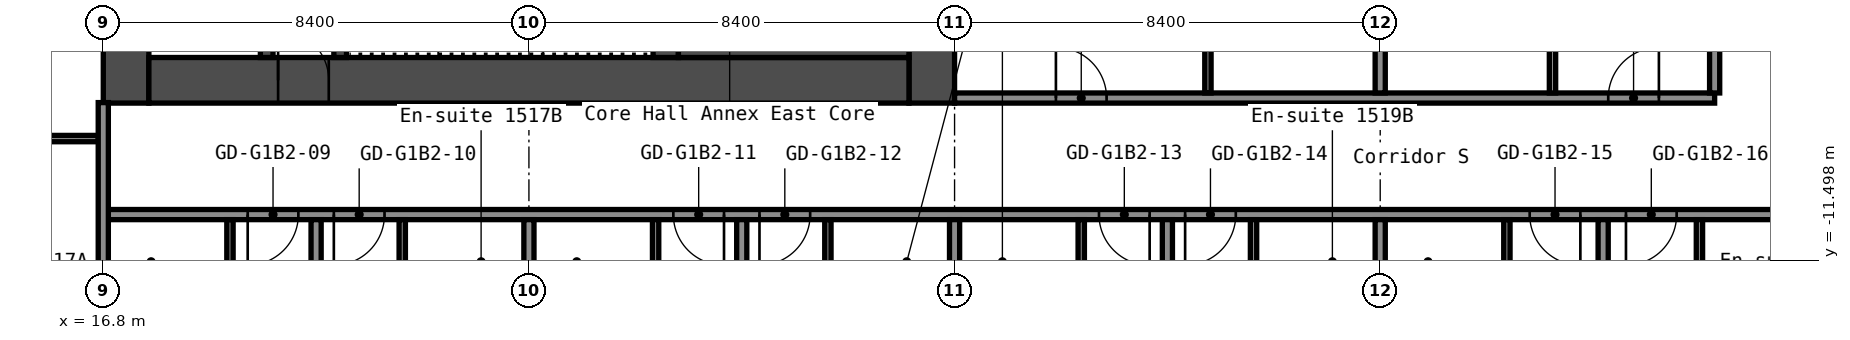
"""IFC4 building model, lengths in metres.
Left out: names, types, materials, properties, quantities, classifications, styles, units other than length and angle.
Written with IfcOpenShell. Run it as: python <this file> out.ifc"""

import sys

from ifc_helpers import new_model, si_unit, direction, frame, frame_2d, origin, place, context, subcontext, project, spatial, rectangle, extrude, element, fill, save


model = new_model("IFC4")
c1 = context("Model", 3, precision=1e-05, world=origin(), true_north=direction((0.0, 1.0)))
c2 = subcontext(c1, "Body", "Model", "MODEL_VIEW")
j1 = project(units=[si_unit("LENGTHUNIT", "METRE"), si_unit("PLANEANGLEUNIT", "RADIAN")], contexts=[c1])
p1 = place(None, origin())
s1 = spatial("IfcSite", under=j1, at=p1, CompositionType="ELEMENT")
p2 = place(p1, origin())
s2 = spatial("IfcBuilding", under=s1, at=p2, CompositionType="ELEMENT")
p3 = place(p2, frame((0.0, 0.0, 55.0)))
s3 = spatial("IfcBuildingStorey", under=s2, at=p3, CompositionType="ELEMENT", Elevation=55.0)
p4 = place(p3, frame((17.25, -8.4, 0.0), z_axis=(0.0, 0.0, 1.0), x_axis=(0.0, 1.0, 0.0)))
e1 = element("IfcWall", 1, at=p4, inside=s3, PredefinedType="SHEAR", context=c2, shape_type="SweptSolid", body=[
    extrude(rectangle(XDim=16.8, YDim=0.9, at=frame_2d((8.4, 0.0))), origin(), (0.0, 0.0, 1.0), 2.8),
])
p5 = place(p4, frame((12.75, 0.0, 0.0)))
e2 = element("IfcOpeningElement", 2, at=p5, cuts=e1, PredefinedType="OPENING", context=c2, shape_type="SweptSolid", body=[
    extrude(rectangle(XDim=1.2, YDim=2.1, at=frame_2d((0.6, 1.05))), frame((0.0, 0.46, 0.0), z_axis=(0.0, -1.0, 0.0), x_axis=(1.0, 0.0, 0.0)), (0.0, 0.0, 1.0), 0.92),
])
p6 = place(p4, frame((2.85, 0.0, 0.0)))
e3 = element("IfcOpeningElement", 3, at=p6, cuts=e1, PredefinedType="OPENING", context=c2, shape_type="SweptSolid", body=[
    extrude(rectangle(XDim=1.2, YDim=2.1, at=frame_2d((0.6, 1.05))), frame((0.0, 0.46, 0.0), z_axis=(0.0, -1.0, 0.0), x_axis=(1.0, 0.0, 0.0)), (0.0, 0.0, 1.0), 0.92),
])
p7 = place(p3, frame((33.15, -8.4, 0.0), z_axis=(0.0, 0.0, 1.0), x_axis=(0.0, 1.0, 0.0)))
e4 = element("IfcWall", 4, at=p7, inside=s3, PredefinedType="SHEAR", context=c2, shape_type="SweptSolid", body=[
    extrude(rectangle(XDim=16.8, YDim=0.9, at=frame_2d((8.4, 0.0))), origin(), (0.0, 0.0, 1.0), 2.8),
])
p8 = place(p3, frame((17.7, -7.95, 0.0), z_axis=(0.0, 0.0, 1.0), x_axis=(1.0, 0.0, 0.0)))
e5 = element("IfcWall", 5, at=p8, inside=s3, PredefinedType="SHEAR", context=c2, shape_type="SweptSolid", body=[
    extrude(rectangle(XDim=15.0, YDim=0.9, at=frame_2d((7.5, 0.0))), origin(), (0.0, 0.0, 1.0), 2.8),
])
p9 = place(p8, frame((2.55, 0.0, 0.0)))
e6 = element("IfcOpeningElement", 6, at=p9, cuts=e5, PredefinedType="OPENING", context=c2, shape_type="SweptSolid", body=[
    extrude(rectangle(XDim=1.0, YDim=2.1, at=frame_2d((0.5, 1.05))), frame((0.0, 0.46, 0.0), z_axis=(0.0, -1.0, 0.0), x_axis=(1.0, 0.0, 0.0)), (0.0, 0.0, 1.0), 0.92),
])
p10 = place(p3, frame((20.025, -7.5, 0.0), z_axis=(0.0, 0.0, 1.0), x_axis=(0.0, 1.0, 0.0)))
e7 = element("IfcWall", 7, at=p10, inside=s3, PredefinedType="SHEAR", context=c2, shape_type="SweptSolid", body=[
    extrude(rectangle(XDim=6.3, YDim=0.25, at=frame_2d((3.15, 0.0))), origin(), (0.0, 0.0, 1.0), 2.8),
])
p11 = place(p10, frame((2.4, 0.0, 0.0)))
e8 = element("IfcOpeningElement", 8, at=p11, cuts=e7, PredefinedType="OPENING", context=c2, shape_type="SweptSolid", body=[
    extrude(rectangle(XDim=1.0, YDim=2.1, at=frame_2d((0.5, 1.05))), frame((0.0, 0.135, 0.0), z_axis=(0.0, -1.0, 0.0), x_axis=(1.0, 0.0, 0.0)), (0.0, 0.0, 1.0), 0.27),
])
p12 = place(p3, frame((21.475, -7.5, 0.0), z_axis=(0.0, 0.0, 1.0), x_axis=(0.0, 1.0, 0.0)))
e9 = element("IfcWall", 9, at=p12, inside=s3, PredefinedType="SHEAR", context=c2, shape_type="SweptSolid", body=[
    extrude(rectangle(XDim=3.75, YDim=0.25, at=frame_2d((1.875, 0.0))), origin(), (0.0, 0.0, 1.0), 2.8),
])
p13 = place(p12, frame((1.3, 0.0, 0.0)))
e10 = element("IfcOpeningElement", 10, at=p13, cuts=e9, PredefinedType="OPENING", context=c2, shape_type="SweptSolid", body=[
    extrude(rectangle(XDim=1.2, YDim=2.1, at=frame_2d((0.6, 1.05))), frame((0.0, 0.135, 0.0), z_axis=(0.0, -1.0, 0.0), x_axis=(1.0, 0.0, 0.0)), (0.0, 0.0, 1.0), 0.27),
])
p14 = place(p3, frame((27.9, -7.5, 0.0), z_axis=(0.0, 0.0, 1.0), x_axis=(0.0, 1.0, 0.0)))
e11 = element("IfcWall", 11, at=p14, inside=s3, PredefinedType="SHEAR", context=c2, shape_type="SweptSolid", body=[
    extrude(rectangle(XDim=3.75, YDim=0.5, at=frame_2d((1.875, 0.0))), origin(), (0.0, 0.0, 1.0), 2.8),
])
p15 = place(p3, frame((28.15, -6.75, 0.0), z_axis=(0.0, 0.0, 1.0), x_axis=(1.0, 0.0, 0.0)))
e12 = element("IfcWall", 12, at=p15, inside=s3, PredefinedType="SHEAR", context=c2, shape_type="SweptSolid", body=[
    extrude(rectangle(XDim=4.55, YDim=1.5, at=frame_2d((2.275, 0.0))), origin(), (0.0, 0.0, 1.0), 2.8),
])
p16 = place(p3, frame((16.8, -10.6, 0.0), z_axis=(0.0, 0.0, 1.0), x_axis=(1.0, 0.0, 0.0)))
e13 = element("IfcWall", 13, at=p16, inside=s3, PredefinedType="PARTITIONING", context=c2, shape_type="SweptSolid", body=[
    extrude(rectangle(XDim=34.3, YDim=0.2, at=frame_2d((17.15, 0.0))), origin(), (0.0, 0.0, 1.0), 2.8),
])
p17 = place(p16, frame((2.85, 0.0, 0.0)))
e14 = element("IfcOpeningElement", 14, at=p17, cuts=e13, PredefinedType="OPENING", context=c2, shape_type="SweptSolid", body=[
    extrude(rectangle(XDim=1.0, YDim=2.1, at=frame_2d((0.5, 1.05))), frame((0.0, 0.11, 0.0), z_axis=(0.0, -1.0, 0.0), x_axis=(1.0, 0.0, 0.0)), (0.0, 0.0, 1.0), 0.22),
])
p18 = place(p16, frame((4.55, 0.0, 0.0)))
e15 = element("IfcOpeningElement", 15, at=p18, cuts=e13, PredefinedType="OPENING", context=c2, shape_type="SweptSolid", body=[
    extrude(rectangle(XDim=1.0, YDim=2.1, at=frame_2d((0.5, 1.05))), frame((0.0, 0.11, 0.0), z_axis=(0.0, -1.0, 0.0), x_axis=(1.0, 0.0, 0.0)), (0.0, 0.0, 1.0), 0.22),
])
p19 = place(p16, frame((11.25, 0.0, 0.0)))
e16 = element("IfcOpeningElement", 16, at=p19, cuts=e13, PredefinedType="OPENING", context=c2, shape_type="SweptSolid", body=[
    extrude(rectangle(XDim=1.0, YDim=2.1, at=frame_2d((0.5, 1.05))), frame((0.0, 0.11, 0.0), z_axis=(0.0, -1.0, 0.0), x_axis=(1.0, 0.0, 0.0)), (0.0, 0.0, 1.0), 0.22),
])
p20 = place(p16, frame((12.95, 0.0, 0.0)))
e17 = element("IfcOpeningElement", 17, at=p20, cuts=e13, PredefinedType="OPENING", context=c2, shape_type="SweptSolid", body=[
    extrude(rectangle(XDim=1.0, YDim=2.1, at=frame_2d((0.5, 1.05))), frame((0.0, 0.11, 0.0), z_axis=(0.0, -1.0, 0.0), x_axis=(1.0, 0.0, 0.0)), (0.0, 0.0, 1.0), 0.22),
])
p21 = place(p16, frame((19.65, 0.0, 0.0)))
e18 = element("IfcOpeningElement", 18, at=p21, cuts=e13, PredefinedType="OPENING", context=c2, shape_type="SweptSolid", body=[
    extrude(rectangle(XDim=1.0, YDim=2.1, at=frame_2d((0.5, 1.05))), frame((0.0, 0.11, 0.0), z_axis=(0.0, -1.0, 0.0), x_axis=(1.0, 0.0, 0.0)), (0.0, 0.0, 1.0), 0.22),
])
p22 = place(p16, frame((21.35, 0.0, 0.0)))
e19 = element("IfcOpeningElement", 19, at=p22, cuts=e13, PredefinedType="OPENING", context=c2, shape_type="SweptSolid", body=[
    extrude(rectangle(XDim=1.0, YDim=2.1, at=frame_2d((0.5, 1.05))), frame((0.0, 0.11, 0.0), z_axis=(0.0, -1.0, 0.0), x_axis=(1.0, 0.0, 0.0)), (0.0, 0.0, 1.0), 0.22),
])
p23 = place(p16, frame((28.15, 0.0, 0.0)))
e20 = element("IfcOpeningElement", 20, at=p23, cuts=e13, PredefinedType="OPENING", context=c2, shape_type="SweptSolid", body=[
    extrude(rectangle(XDim=1.0, YDim=2.1, at=frame_2d((0.5, 1.05))), frame((0.0, 0.11, 0.0), z_axis=(0.0, -1.0, 0.0), x_axis=(1.0, 0.0, 0.0)), (0.0, 0.0, 1.0), 0.22),
])
p24 = place(p16, frame((30.05, 0.0, 0.0)))
e21 = element("IfcOpeningElement", 21, at=p24, cuts=e13, PredefinedType="OPENING", context=c2, shape_type="SweptSolid", body=[
    extrude(rectangle(XDim=1.0, YDim=2.1, at=frame_2d((0.5, 1.05))), frame((0.0, 0.11, 0.0), z_axis=(0.0, -1.0, 0.0), x_axis=(1.0, 0.0, 0.0)), (0.0, 0.0, 1.0), 0.22),
])
p25 = place(p3, frame((14.363, -9.1, 0.0), z_axis=(0.0, 0.0, 1.0), x_axis=(1.0, 0.0, 0.0)))
e22 = element("IfcWall", 22, at=p25, inside=s3, PredefinedType="PARTITIONING", context=c2, shape_type="SweptSolid", body=[
    extrude(rectangle(XDim=2.337, YDim=0.125, at=frame_2d((1.169, 0.0))), origin(), (0.0, 0.0, 1.0), 2.8),
])
p26 = place(p3, frame((33.6, -8.3, 0.0), z_axis=(0.0, 0.0, 1.0), x_axis=(1.0, 0.0, 0.0)))
e23 = element("IfcWall", 23, at=p26, inside=s3, PredefinedType="PARTITIONING", context=c2, shape_type="SweptSolid", body=[
    extrude(rectangle(XDim=15.0, YDim=0.2, at=frame_2d((7.5, 0.0))), origin(), (0.0, 0.0, 1.0), 2.8),
])
p27 = place(p26, frame((2.0, 0.0, 0.0)))
e24 = element("IfcOpeningElement", 24, at=p27, cuts=e23, PredefinedType="OPENING", context=c2, shape_type="SweptSolid", body=[
    extrude(rectangle(XDim=1.0, YDim=2.1, at=frame_2d((0.5, 1.05))), frame((0.0, 0.11, 0.0), z_axis=(0.0, -1.0, 0.0), x_axis=(1.0, 0.0, 0.0)), (0.0, 0.0, 1.0), 0.22),
])
p28 = place(p26, frame((12.9, 0.0, 0.0)))
e25 = element("IfcOpeningElement", 25, at=p28, cuts=e23, PredefinedType="OPENING", context=c2, shape_type="SweptSolid", body=[
    extrude(rectangle(XDim=1.0, YDim=2.1, at=frame_2d((0.5, 1.05))), frame((0.0, 0.11, 0.0), z_axis=(0.0, -1.0, 0.0), x_axis=(1.0, 0.0, 0.0)), (0.0, 0.0, 1.0), 0.22),
])
p29 = place(p3, frame((16.8, -20.3, 0.0), z_axis=(0.0, 0.0, 1.0), x_axis=(0.0, 1.0, 0.0)))
e26 = element("IfcWall", 26, at=p29, inside=s3, PredefinedType="PARTITIONING", context=c2, shape_type="SweptSolid", body=[
    extrude(rectangle(XDim=11.91, YDim=0.2, at=frame_2d((5.955, 0.0))), origin(), (0.0, 0.0, 1.0), 2.8),
])
p30 = place(p3, frame((19.3, -13.6, 0.0), z_axis=(0.0, 0.0, 1.0), x_axis=(0.0, 1.0, 0.0)))
e27 = element("IfcWall", 27, at=p30, inside=s3, PredefinedType="PARTITIONING", context=c2, shape_type="SweptSolid", body=[
    extrude(rectangle(XDim=2.9, YDim=0.125, at=frame_2d((1.45, 0.0))), origin(), (0.0, 0.0, 1.0), 2.8),
])
p31 = place(p30, frame((0.6, 0.0, 0.0)))
e28 = element("IfcOpeningElement", 28, at=p31, cuts=e27, PredefinedType="OPENING", context=c2, shape_type="SweptSolid", body=[
    extrude(rectangle(XDim=0.8, YDim=2.1, at=frame_2d((0.4, 1.05))), frame((0.0, 0.073, 0.0), z_axis=(0.0, -1.0, 0.0), x_axis=(1.0, 0.0, 0.0)), (0.0, 0.0, 1.0), 0.145),
])
p32 = place(p3, frame((21.0, -20.3, 0.0), z_axis=(0.0, 0.0, 1.0), x_axis=(0.0, 1.0, 0.0)))
e29 = element("IfcWall", 29, at=p32, inside=s3, PredefinedType="PARTITIONING", context=c2, shape_type="SweptSolid", body=[
    extrude(rectangle(XDim=9.6, YDim=0.2, at=frame_2d((4.8, 0.0))), origin(), (0.0, 0.0, 1.0), 2.8),
])
p33 = place(p3, frame((22.7, -13.6, 0.0), z_axis=(0.0, 0.0, 1.0), x_axis=(0.0, 1.0, 0.0)))
e30 = element("IfcWall", 30, at=p33, inside=s3, PredefinedType="PARTITIONING", context=c2, shape_type="SweptSolid", body=[
    extrude(rectangle(XDim=2.9, YDim=0.125, at=frame_2d((1.45, 0.0))), origin(), (0.0, 0.0, 1.0), 2.8),
])
p34 = place(p33, frame((0.6, 0.0, 0.0)))
e31 = element("IfcOpeningElement", 31, at=p34, cuts=e30, PredefinedType="OPENING", context=c2, shape_type="SweptSolid", body=[
    extrude(rectangle(XDim=0.8, YDim=2.1, at=frame_2d((0.4, 1.05))), frame((0.0, 0.073, 0.0), z_axis=(0.0, -1.0, 0.0), x_axis=(1.0, 0.0, 0.0)), (0.0, 0.0, 1.0), 0.145),
])
p35 = place(p3, frame((25.2, -20.3, 0.0), z_axis=(0.0, 0.0, 1.0), x_axis=(0.0, 1.0, 0.0)))
e32 = element("IfcWall", 32, at=p35, inside=s3, PredefinedType="PARTITIONING", context=c2, shape_type="SweptSolid", body=[
    extrude(rectangle(XDim=9.6, YDim=0.2, at=frame_2d((4.8, 0.0))), origin(), (0.0, 0.0, 1.0), 2.8),
])
p36 = place(p3, frame((27.7, -13.6, 0.0), z_axis=(0.0, 0.0, 1.0), x_axis=(0.0, 1.0, 0.0)))
e33 = element("IfcWall", 33, at=p36, inside=s3, PredefinedType="PARTITIONING", context=c2, shape_type="SweptSolid", body=[
    extrude(rectangle(XDim=2.9, YDim=0.125, at=frame_2d((1.45, 0.0))), origin(), (0.0, 0.0, 1.0), 2.8),
])
p37 = place(p36, frame((0.6, 0.0, 0.0)))
e34 = element("IfcOpeningElement", 34, at=p37, cuts=e33, PredefinedType="OPENING", context=c2, shape_type="SweptSolid", body=[
    extrude(rectangle(XDim=0.8, YDim=2.1, at=frame_2d((0.4, 1.05))), frame((0.0, 0.073, 0.0), z_axis=(0.0, -1.0, 0.0), x_axis=(1.0, 0.0, 0.0)), (0.0, 0.0, 1.0), 0.145),
])
p38 = place(p3, frame((29.4, -20.3, 0.0), z_axis=(0.0, 0.0, 1.0), x_axis=(0.0, 1.0, 0.0)))
e35 = element("IfcWall", 35, at=p38, inside=s3, PredefinedType="PARTITIONING", context=c2, shape_type="SweptSolid", body=[
    extrude(rectangle(XDim=9.6, YDim=0.2, at=frame_2d((4.8, 0.0))), origin(), (0.0, 0.0, 1.0), 2.8),
])
p39 = place(p3, frame((31.1, -13.6, 0.0), z_axis=(0.0, 0.0, 1.0), x_axis=(0.0, 1.0, 0.0)))
e36 = element("IfcWall", 36, at=p39, inside=s3, PredefinedType="PARTITIONING", context=c2, shape_type="SweptSolid", body=[
    extrude(rectangle(XDim=2.9, YDim=0.125, at=frame_2d((1.45, 0.0))), origin(), (0.0, 0.0, 1.0), 2.8),
])
p40 = place(p39, frame((0.6, 0.0, 0.0)))
e37 = element("IfcOpeningElement", 37, at=p40, cuts=e36, PredefinedType="OPENING", context=c2, shape_type="SweptSolid", body=[
    extrude(rectangle(XDim=0.8, YDim=2.1, at=frame_2d((0.4, 1.05))), frame((0.0, 0.073, 0.0), z_axis=(0.0, -1.0, 0.0), x_axis=(1.0, 0.0, 0.0)), (0.0, 0.0, 1.0), 0.145),
])
p41 = place(p3, frame((33.6, -20.3, 0.0), z_axis=(0.0, 0.0, 1.0), x_axis=(0.0, 1.0, 0.0)))
e38 = element("IfcWall", 38, at=p41, inside=s3, PredefinedType="PARTITIONING", context=c2, shape_type="SweptSolid", body=[
    extrude(rectangle(XDim=9.6, YDim=0.2, at=frame_2d((4.8, 0.0))), origin(), (0.0, 0.0, 1.0), 2.8),
])
p42 = place(p3, frame((36.1, -13.6, 0.0), z_axis=(0.0, 0.0, 1.0), x_axis=(0.0, 1.0, 0.0)))
e39 = element("IfcWall", 39, at=p42, inside=s3, PredefinedType="PARTITIONING", context=c2, shape_type="SweptSolid", body=[
    extrude(rectangle(XDim=2.9, YDim=0.125, at=frame_2d((1.45, 0.0))), origin(), (0.0, 0.0, 1.0), 2.8),
])
p43 = place(p42, frame((0.6, 0.0, 0.0)))
e40 = element("IfcOpeningElement", 40, at=p43, cuts=e39, PredefinedType="OPENING", context=c2, shape_type="SweptSolid", body=[
    extrude(rectangle(XDim=0.8, YDim=2.1, at=frame_2d((0.4, 1.05))), frame((0.0, 0.073, 0.0), z_axis=(0.0, -1.0, 0.0), x_axis=(1.0, 0.0, 0.0)), (0.0, 0.0, 1.0), 0.145),
])
p44 = place(p3, frame((37.8, -20.3, 0.0), z_axis=(0.0, 0.0, 1.0), x_axis=(0.0, 1.0, 0.0)))
e41 = element("IfcWall", 41, at=p44, inside=s3, PredefinedType="PARTITIONING", context=c2, shape_type="SweptSolid", body=[
    extrude(rectangle(XDim=9.6, YDim=0.2, at=frame_2d((4.8, 0.0))), origin(), (0.0, 0.0, 1.0), 2.8),
])
p45 = place(p3, frame((38.6, -8.2, 0.0), z_axis=(0.0, 0.0, 1.0), x_axis=(0.0, 1.0, 0.0)))
e42 = element("IfcWall", 42, at=p45, inside=s3, PredefinedType="PARTITIONING", context=c2, shape_type="SweptSolid", body=[
    extrude(rectangle(XDim=3.3, YDim=0.125, at=frame_2d((1.65, 0.0))), origin(), (0.0, 0.0, 1.0), 2.8),
])
p46 = place(p3, frame((39.5, -13.6, 0.0), z_axis=(0.0, 0.0, 1.0), x_axis=(0.0, 1.0, 0.0)))
e43 = element("IfcWall", 43, at=p46, inside=s3, PredefinedType="PARTITIONING", context=c2, shape_type="SweptSolid", body=[
    extrude(rectangle(XDim=2.9, YDim=0.125, at=frame_2d((1.45, 0.0))), origin(), (0.0, 0.0, 1.0), 2.8),
])
p47 = place(p46, frame((0.6, 0.0, 0.0)))
e44 = element("IfcOpeningElement", 44, at=p47, cuts=e43, PredefinedType="OPENING", context=c2, shape_type="SweptSolid", body=[
    extrude(rectangle(XDim=0.8, YDim=2.1, at=frame_2d((0.4, 1.05))), frame((0.0, 0.073, 0.0), z_axis=(0.0, -1.0, 0.0), x_axis=(1.0, 0.0, 0.0)), (0.0, 0.0, 1.0), 0.145),
])
p48 = place(p3, frame((42.0, -20.3, 0.0), z_axis=(0.0, 0.0, 1.0), x_axis=(0.0, 1.0, 0.0)))
e45 = element("IfcWall", 45, at=p48, inside=s3, PredefinedType="PARTITIONING", context=c2, shape_type="SweptSolid", body=[
    extrude(rectangle(XDim=9.6, YDim=0.2, at=frame_2d((4.8, 0.0))), origin(), (0.0, 0.0, 1.0), 2.8),
])
p49 = place(p3, frame((42.0, -8.2, 0.0), z_axis=(0.0, 0.0, 1.0), x_axis=(0.0, 1.0, 0.0)))
e46 = element("IfcWall", 46, at=p49, inside=s3, PredefinedType="PARTITIONING", context=c2, shape_type="SweptSolid", body=[
    extrude(rectangle(XDim=16.4, YDim=0.2, at=frame_2d((8.2, 0.0))), origin(), (0.0, 0.0, 1.0), 2.8),
])
p50 = place(p3, frame((44.5, -13.6, 0.0), z_axis=(0.0, 0.0, 1.0), x_axis=(0.0, 1.0, 0.0)))
e47 = element("IfcWall", 47, at=p50, inside=s3, PredefinedType="PARTITIONING", context=c2, shape_type="SweptSolid", body=[
    extrude(rectangle(XDim=2.9, YDim=0.125, at=frame_2d((1.45, 0.0))), origin(), (0.0, 0.0, 1.0), 2.8),
])
p51 = place(p50, frame((0.6, 0.0, 0.0)))
e48 = element("IfcOpeningElement", 48, at=p51, cuts=e47, PredefinedType="OPENING", context=c2, shape_type="SweptSolid", body=[
    extrude(rectangle(XDim=0.8, YDim=2.1, at=frame_2d((0.4, 1.05))), frame((0.0, 0.073, 0.0), z_axis=(0.0, -1.0, 0.0), x_axis=(1.0, 0.0, 0.0)), (0.0, 0.0, 1.0), 0.145),
])
p52 = place(p3, frame((45.4, -8.2, 0.0), z_axis=(0.0, 0.0, 1.0), x_axis=(0.0, 1.0, 0.0)))
e49 = element("IfcWall", 49, at=p52, inside=s3, PredefinedType="PARTITIONING", context=c2, shape_type="SweptSolid", body=[
    extrude(rectangle(XDim=3.3, YDim=0.125, at=frame_2d((1.65, 0.0))), origin(), (0.0, 0.0, 1.0), 2.8),
])
p53 = place(p3, frame((46.4, -20.3, 0.0), z_axis=(0.0, 0.0, 1.0), x_axis=(0.0, 1.0, 0.0)))
e50 = element("IfcWall", 50, at=p53, inside=s3, PredefinedType="PARTITIONING", context=c2, shape_type="SweptSolid", body=[
    extrude(rectangle(XDim=9.6, YDim=0.2, at=frame_2d((4.8, 0.0))), origin(), (0.0, 0.0, 1.0), 2.8),
])
p54 = place(p3, frame((48.3, -13.6, 0.0), z_axis=(0.0, 0.0, 1.0), x_axis=(0.0, 1.0, 0.0)))
e51 = element("IfcWall", 51, at=p54, inside=s3, PredefinedType="PARTITIONING", context=c2, shape_type="SweptSolid", body=[
    extrude(rectangle(XDim=2.9, YDim=0.125, at=frame_2d((1.45, 0.0))), origin(), (0.0, 0.0, 1.0), 2.8),
])
p55 = place(p54, frame((0.6, 0.0, 0.0)))
e52 = element("IfcOpeningElement", 52, at=p55, cuts=e51, PredefinedType="OPENING", context=c2, shape_type="SweptSolid", body=[
    extrude(rectangle(XDim=0.8, YDim=2.1, at=frame_2d((0.4, 1.05))), frame((0.0, 0.073, 0.0), z_axis=(0.0, -1.0, 0.0), x_axis=(1.0, 0.0, 0.0)), (0.0, 0.0, 1.0), 0.145),
])
p56 = place(p3, frame((48.6, -8.2, 0.0), z_axis=(0.0, 0.0, 1.0), x_axis=(0.0, 1.0, 0.0)))
e53 = element("IfcWall", 53, at=p56, inside=s3, PredefinedType="PARTITIONING", context=c2, shape_type="SweptSolid", body=[
    extrude(rectangle(XDim=16.4, YDim=0.2, at=frame_2d((8.2, 0.0))), origin(), (0.0, 0.0, 1.0), 2.8),
])
p57 = place(p9, origin())
e54 = element("IfcDoor", 54, at=p57, inside=s3, OperationType="SINGLE_SWING_RIGHT", PredefinedType="DOOR", context=c2, shape_type="SweptSolid", body=[
    extrude(rectangle(XDim=1.0, YDim=2.1, at=frame_2d((0.5, 1.05))), frame((0.0, 0.025, 0.0), z_axis=(0.0, -1.0, 0.0), x_axis=(1.0, 0.0, 0.0)), (0.0, 0.0, 1.0), 0.05),
])
fill(e6, e54)
p58 = place(p17, origin())
e55 = element("IfcDoor", 55, at=p58, inside=s3, OperationType="SINGLE_SWING_LEFT", PredefinedType="DOOR", context=c2, shape_type="SweptSolid", body=[
    extrude(rectangle(XDim=1.0, YDim=2.1, at=frame_2d((0.5, 1.05))), frame((0.0, 0.025, 0.0), z_axis=(0.0, -1.0, 0.0), x_axis=(1.0, 0.0, 0.0)), (0.0, 0.0, 1.0), 0.05),
])
fill(e14, e55)
p59 = place(p18, origin())
e56 = element("IfcDoor", 56, at=p59, inside=s3, OperationType="SINGLE_SWING_LEFT", PredefinedType="DOOR", context=c2, shape_type="SweptSolid", body=[
    extrude(rectangle(XDim=1.0, YDim=2.1, at=frame_2d((0.5, 1.05))), frame((0.0, 0.025, 0.0), z_axis=(0.0, -1.0, 0.0), x_axis=(1.0, 0.0, 0.0)), (0.0, 0.0, 1.0), 0.05),
])
fill(e15, e56)
p60 = place(p19, origin())
e57 = element("IfcDoor", 57, at=p60, inside=s3, OperationType="SINGLE_SWING_RIGHT", PredefinedType="DOOR", context=c2, shape_type="SweptSolid", body=[
    extrude(rectangle(XDim=1.0, YDim=2.1, at=frame_2d((0.5, 1.05))), frame((0.0, 0.025, 0.0), z_axis=(0.0, -1.0, 0.0), x_axis=(1.0, 0.0, 0.0)), (0.0, 0.0, 1.0), 0.05),
])
fill(e16, e57)
p61 = place(p20, origin())
e58 = element("IfcDoor", 58, at=p61, inside=s3, OperationType="SINGLE_SWING_LEFT", PredefinedType="DOOR", context=c2, shape_type="SweptSolid", body=[
    extrude(rectangle(XDim=1.0, YDim=2.1, at=frame_2d((0.5, 1.05))), frame((0.0, 0.025, 0.0), z_axis=(0.0, -1.0, 0.0), x_axis=(1.0, 0.0, 0.0)), (0.0, 0.0, 1.0), 0.05),
])
fill(e17, e58)
p62 = place(p21, origin())
e59 = element("IfcDoor", 59, at=p62, inside=s3, OperationType="SINGLE_SWING_RIGHT", PredefinedType="DOOR", context=c2, shape_type="SweptSolid", body=[
    extrude(rectangle(XDim=1.0, YDim=2.1, at=frame_2d((0.5, 1.05))), frame((0.0, 0.025, 0.0), z_axis=(0.0, -1.0, 0.0), x_axis=(1.0, 0.0, 0.0)), (0.0, 0.0, 1.0), 0.05),
])
fill(e18, e59)
p63 = place(p22, origin())
e60 = element("IfcDoor", 60, at=p63, inside=s3, OperationType="SINGLE_SWING_LEFT", PredefinedType="DOOR", context=c2, shape_type="SweptSolid", body=[
    extrude(rectangle(XDim=1.0, YDim=2.1, at=frame_2d((0.5, 1.05))), frame((0.0, 0.025, 0.0), z_axis=(0.0, -1.0, 0.0), x_axis=(1.0, 0.0, 0.0)), (0.0, 0.0, 1.0), 0.05),
])
fill(e19, e60)
p64 = place(p23, origin())
e61 = element("IfcDoor", 61, at=p64, inside=s3, OperationType="SINGLE_SWING_RIGHT", PredefinedType="DOOR", context=c2, shape_type="SweptSolid", body=[
    extrude(rectangle(XDim=1.0, YDim=2.1, at=frame_2d((0.5, 1.05))), frame((0.0, 0.025, 0.0), z_axis=(0.0, -1.0, 0.0), x_axis=(1.0, 0.0, 0.0)), (0.0, 0.0, 1.0), 0.05),
])
fill(e20, e61)
p65 = place(p24, origin())
e62 = element("IfcDoor", 62, at=p65, inside=s3, OperationType="SINGLE_SWING_LEFT", PredefinedType="DOOR", context=c2, shape_type="SweptSolid", body=[
    extrude(rectangle(XDim=1.0, YDim=2.1, at=frame_2d((0.5, 1.05))), frame((0.0, 0.025, 0.0), z_axis=(0.0, -1.0, 0.0), x_axis=(1.0, 0.0, 0.0)), (0.0, 0.0, 1.0), 0.05),
])
fill(e21, e62)
p66 = place(p27, origin())
e63 = element("IfcDoor", 63, at=p66, inside=s3, OperationType="SINGLE_SWING_RIGHT", PredefinedType="DOOR", context=c2, shape_type="SweptSolid", body=[
    extrude(rectangle(XDim=1.0, YDim=2.1, at=frame_2d((0.5, 1.05))), frame((0.0, 0.025, 0.0), z_axis=(0.0, -1.0, 0.0), x_axis=(1.0, 0.0, 0.0)), (0.0, 0.0, 1.0), 0.05),
])
fill(e24, e63)
p67 = place(p28, origin())
e64 = element("IfcDoor", 64, at=p67, inside=s3, OperationType="SINGLE_SWING_LEFT", PredefinedType="DOOR", context=c2, shape_type="SweptSolid", body=[
    extrude(rectangle(XDim=1.0, YDim=2.1, at=frame_2d((0.5, 1.05))), frame((0.0, 0.025, 0.0), z_axis=(0.0, -1.0, 0.0), x_axis=(1.0, 0.0, 0.0)), (0.0, 0.0, 1.0), 0.05),
])
fill(e25, e64)
save(model, sys.argv[1])
